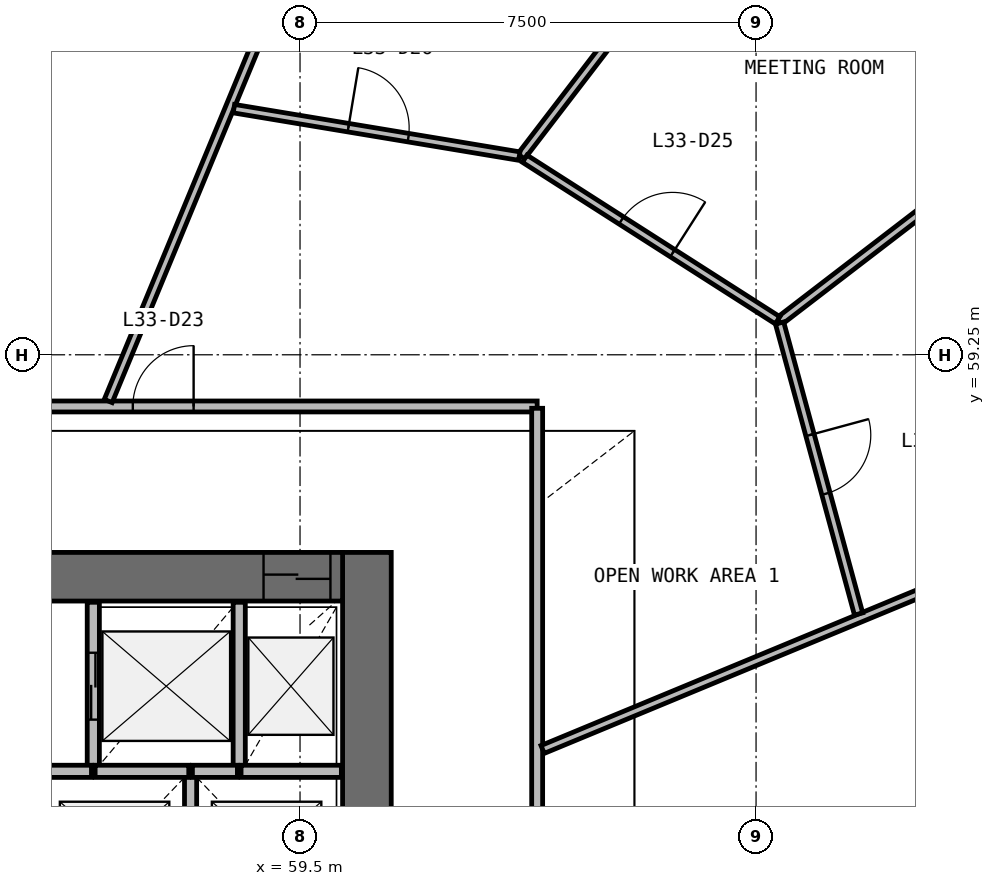
"""IFC4 building model, lengths in metres.
Left out: names, types, materials, properties, quantities, classifications, styles, units other than length and angle.
Written with IfcOpenShell. Run it as: python <this file> out.ifc"""

import sys

from ifc_helpers import new_model, si_unit, direction, frame, frame_2d, origin, place, context, subcontext, project, spatial, rectangle, extrude, source, transform, mapped, element, fill, save


model = new_model("IFC4")
c1 = context("Model", 3, precision=1e-05, world=origin(), true_north=direction((0.0, 1.0)))
c2 = subcontext(c1, "Body", "Model", "MODEL_VIEW")
j1 = project(units=[si_unit("LENGTHUNIT", "METRE"), si_unit("PLANEANGLEUNIT", "RADIAN")], contexts=[c1])
p1 = place(None, origin())
s1 = spatial("IfcSite", under=j1, at=p1, CompositionType="ELEMENT")
p2 = place(p1, origin())
s2 = spatial("IfcBuilding", under=s1, at=p2, CompositionType="ELEMENT")
p3 = place(p2, frame((0.0, 0.0, 140.9)))
s3 = spatial("IfcBuildingStorey", under=s2, at=p3, CompositionType="ELEMENT", Elevation=140.9)
p4 = place(p3, frame((60.6, 40.0, 0.0), z_axis=(0.0, 0.0, 1.0), x_axis=(0.0, 1.0, 0.0)))
e1 = element("IfcWall", 1, at=p4, inside=s3, PredefinedType="SHEAR", context=c2, shape_type="SweptSolid", body=[
    extrude(rectangle(XDim=16.0, YDim=0.8, at=frame_2d((8.0, 0.0))), origin(), (0.0, 0.0, 1.0), 3.9),
])
p5 = place(p4, frame((7.1, 0.0, 0.0)))
e2 = element("IfcOpeningElement", 2, at=p5, cuts=e1, PredefinedType="OPENING", context=c2, shape_type="SweptSolid", body=[
    extrude(rectangle(XDim=1.8, YDim=2.1, at=frame_2d((0.9, 1.05))), frame((0.0, 0.41, 0.0), z_axis=(0.0, -1.0, 0.0), x_axis=(1.0, 0.0, 0.0)), (0.0, 0.0, 1.0), 0.82),
])
p6 = place(p3, frame((60.2, 55.6, 0.0), z_axis=(0.0, 0.0, 1.0), x_axis=(-1.0, 0.0, 0.0)))
e3 = element("IfcWall", 3, at=p6, inside=s3, PredefinedType="SHEAR", context=c2, shape_type="SweptSolid", body=[
    extrude(rectangle(XDim=16.4, YDim=0.8, at=frame_2d((8.2, 0.0))), origin(), (0.0, 0.0, 1.0), 3.9),
])
p7 = place(p6, frame((0.2, 0.0, 0.0)))
e4 = element("IfcOpeningElement", 4, at=p7, cuts=e3, PredefinedType="OPENING", context=c2, shape_type="SweptSolid", body=[
    extrude(rectangle(XDim=1.1, YDim=2.1, at=frame_2d((0.55, 1.05))), frame((0.0, 0.41, 0.0), z_axis=(0.0, -1.0, 0.0), x_axis=(1.0, 0.0, 0.0)), (0.0, 0.0, 1.0), 0.82),
])
p8 = place(p6, frame((10.1, 0.0, 0.0)))
e5 = element("IfcOpeningElement", 5, at=p8, cuts=e3, PredefinedType="OPENING", context=c2, shape_type="SweptSolid", body=[
    extrude(rectangle(XDim=1.2, YDim=2.1, at=frame_2d((0.6, 1.05))), frame((0.0, 0.41, 0.0), z_axis=(0.0, -1.0, 0.0), x_axis=(1.0, 0.0, 0.0)), (0.0, 0.0, 1.0), 0.82),
])
p9 = place(p6, frame((7.05, 0.0, 0.0)))
e6 = element("IfcOpeningElement", 6, at=p9, cuts=e3, PredefinedType="OPENING", context=c2, shape_type="SweptSolid", body=[
    extrude(rectangle(XDim=1.1, YDim=2.1, at=frame_2d((0.55, 1.05))), frame((0.0, 0.41, 0.0), z_axis=(0.0, -1.0, 0.0), x_axis=(1.0, 0.0, 0.0)), (0.0, 0.0, 1.0), 0.82),
])
p10 = place(p3, frame((56.1, 55.18, 0.0), z_axis=(0.0, 0.0, 1.0), x_axis=(0.0, -1.0, 0.0)))
e7 = element("IfcWall", 7, at=p10, inside=s3, PredefinedType="SOLIDWALL", context=c2, shape_type="SweptSolid", body=[
    extrude(rectangle(XDim=2.78, YDim=0.2, at=frame_2d((1.39, 0.0))), origin(), (0.0, 0.0, 1.0), 3.58),
])
p11 = place(p10, frame((0.83, 0.0, 0.0)))
e8 = element("IfcOpeningElement", 8, at=p11, cuts=e7, PredefinedType="OPENING", context=c2, shape_type="SweptSolid", body=[
    extrude(rectangle(XDim=1.1, YDim=2.1, at=frame_2d((0.55, 1.05))), frame((0.0, 0.11, 0.0), z_axis=(0.0, -1.0, 0.0), x_axis=(1.0, 0.0, 0.0)), (0.0, 0.0, 1.0), 0.22),
])
p12 = place(p3, frame((58.5, 52.4, 0.0), z_axis=(0.0, 0.0, 1.0), x_axis=(0.0, 1.0, 0.0)))
e9 = element("IfcWall", 9, at=p12, inside=s3, PredefinedType="SOLIDWALL", context=c2, shape_type="SweptSolid", body=[
    extrude(rectangle(XDim=2.78, YDim=0.2, at=frame_2d((1.39, 0.0))), origin(), (0.0, 0.0, 1.0), 3.58),
])
p13 = place(p3, frame((57.7, 50.01, 0.0), z_axis=(0.0, 0.0, 1.0), x_axis=(0.0, 1.0, 0.0)))
e10 = element("IfcWall", 10, at=p13, inside=s3, PredefinedType="SOLIDWALL", context=c2, shape_type="SweptSolid", body=[
    extrude(rectangle(XDim=2.39, YDim=0.2, at=frame_2d((1.195, 0.0))), origin(), (0.0, 0.0, 1.0), 3.58),
])
p14 = place(p3, frame((60.18, 52.4, 0.0), z_axis=(0.0, 0.0, 1.0), x_axis=(-1.0, 0.0, 0.0)))
e11 = element("IfcWall", 11, at=p14, inside=s3, PredefinedType="SOLIDWALL", context=c2, shape_type="SweptSolid", body=[
    extrude(rectangle(XDim=1.65, YDim=0.2, at=frame_2d((0.825, 0.0))), origin(), (0.0, 0.0, 1.0), 3.58),
])
p15 = place(p3, frame((57.67, 52.4, 0.0), z_axis=(0.0, 0.0, 1.0), x_axis=(-1.0, 0.0, 0.0)))
e12 = element("IfcWall", 12, at=p15, inside=s3, PredefinedType="SOLIDWALL", context=c2, shape_type="SweptSolid", body=[
    extrude(rectangle(XDim=1.54, YDim=0.2, at=frame_2d((0.77, 0.0))), origin(), (0.0, 0.0, 1.0), 3.58),
])
p16 = place(p3, frame((56.07, 52.4, 0.0), z_axis=(0.0, 0.0, 1.0), x_axis=(-1.0, 0.0, 0.0)))
e13 = element("IfcWall", 13, at=p16, inside=s3, PredefinedType="SOLIDWALL", context=c2, shape_type="SweptSolid", body=[
    extrude(rectangle(XDim=0.84, YDim=0.2, at=frame_2d((0.42, 0.0))), origin(), (0.0, 0.0, 1.0), 3.58),
])
p17 = place(p3, frame((58.47, 52.4, 0.0), z_axis=(0.0, 0.0, 1.0), x_axis=(-1.0, 0.0, 0.0)))
e14 = element("IfcWall", 14, at=p17, inside=s3, PredefinedType="SOLIDWALL", context=c2, shape_type="SweptSolid", body=[
    extrude(rectangle(XDim=0.74, YDim=0.2, at=frame_2d((0.37, 0.0))), origin(), (0.0, 0.0, 1.0), 3.58),
])
p18 = place(p3, frame((40.6, 58.4, 0.0), z_axis=(0.0, 0.0, 1.0), x_axis=(1.0, 0.0, 0.0)))
e15 = element("IfcWall", 15, at=p18, inside=s3, PredefinedType="PARTITIONING", context=c2, shape_type="SweptSolid", body=[
    extrude(rectangle(XDim=22.8, YDim=0.18, at=frame_2d((11.4, 0.0))), origin(), (0.0, 0.0, 1.0), 2.88),
])
p19 = place(p18, frame((16.15, 0.0, 0.0)))
e16 = element("IfcOpeningElement", 16, at=p19, cuts=e15, PredefinedType="OPENING", context=c2, shape_type="SweptSolid", body=[
    extrude(rectangle(XDim=1.0, YDim=2.1, at=frame_2d((0.5, 1.05))), frame((0.0, 0.1, 0.0), z_axis=(0.0, -1.0, 0.0), x_axis=(1.0, 0.0, 0.0)), (0.0, 0.0, 1.0), 0.2),
])
p20 = place(p18, frame((10.95, 0.0, 0.0)))
e17 = element("IfcOpeningElement", 17, at=p20, cuts=e15, PredefinedType="OPENING", context=c2, shape_type="SweptSolid", body=[
    extrude(rectangle(XDim=1.0, YDim=2.1, at=frame_2d((0.5, 1.05))), frame((0.0, 0.1, 0.0), z_axis=(0.0, -1.0, 0.0), x_axis=(1.0, 0.0, 0.0)), (0.0, 0.0, 1.0), 0.2),
])
p21 = place(p18, frame((8.75, 0.0, 0.0)))
e18 = element("IfcOpeningElement", 18, at=p21, cuts=e15, PredefinedType="OPENING", context=c2, shape_type="SweptSolid", body=[
    extrude(rectangle(XDim=1.0, YDim=2.1, at=frame_2d((0.5, 1.05))), frame((0.0, 0.1, 0.0), z_axis=(0.0, -1.0, 0.0), x_axis=(1.0, 0.0, 0.0)), (0.0, 0.0, 1.0), 0.2),
])
p22 = place(p3, frame((63.4, 58.37, 0.0), z_axis=(0.0, 0.0, 1.0), x_axis=(0.0, -1.0, 0.0)))
e19 = element("IfcWall", 19, at=p22, inside=s3, PredefinedType="PARTITIONING", context=c2, shape_type="SweptSolid", body=[
    extrude(rectangle(XDim=20.74, YDim=0.18, at=frame_2d((10.37, 0.0))), origin(), (0.0, 0.0, 1.0), 2.88),
])
p23 = place(p22, frame((15.39, 0.0, 0.0)))
e20 = element("IfcOpeningElement", 20, at=p23, cuts=e19, PredefinedType="OPENING", context=c2, shape_type="SweptSolid", body=[
    extrude(rectangle(XDim=0.9, YDim=2.1, at=frame_2d((0.45, 1.05))), frame((0.0, 0.1, 0.0), z_axis=(0.0, -1.0, 0.0), x_axis=(1.0, 0.0, 0.0)), (0.0, 0.0, 1.0), 0.2),
])
p24 = place(p22, frame((12.19, 0.0, 0.0)))
e21 = element("IfcOpeningElement", 21, at=p24, cuts=e19, PredefinedType="OPENING", context=c2, shape_type="SweptSolid", body=[
    extrude(rectangle(XDim=0.9, YDim=2.1, at=frame_2d((0.45, 1.05))), frame((0.0, 0.1, 0.0), z_axis=(0.0, -1.0, 0.0), x_axis=(1.0, 0.0, 0.0)), (0.0, 0.0, 1.0), 0.2),
])
p25 = place(p22, frame((9.89, 0.0, 0.0)))
e22 = element("IfcOpeningElement", 22, at=p25, cuts=e19, PredefinedType="OPENING", context=c2, shape_type="SweptSolid", body=[
    extrude(rectangle(XDim=1.0, YDim=2.1, at=frame_2d((0.5, 1.05))), frame((0.0, 0.1, 0.0), z_axis=(0.0, -1.0, 0.0), x_axis=(1.0, 0.0, 0.0)), (0.0, 0.0, 1.0), 0.2),
])
p26 = place(p3, frame((73.93, 57.084, 0.0), z_axis=(0.0, 0.0, 1.0), x_axis=(-0.923879643786, -0.382683163725, 0.0)))
e23 = element("IfcWall", 23, at=p26, inside=s3, PredefinedType="PARTITIONING", context=c2, shape_type="SweptSolid", body=[
    extrude(rectangle(XDim=11.3, YDim=0.14, at=frame_2d((5.65, 0.0))), origin(), (0.0, 0.0, 1.0), 2.88),
])
p27 = place(p3, frame((60.394, 68.264, 0.0), z_axis=(0.0, 0.0, 1.0), x_axis=(-0.382674486363, -0.923883238016, 0.0)))
e24 = element("IfcWall", 24, at=p27, inside=s3, PredefinedType="PARTITIONING", context=c2, shape_type="SweptSolid", body=[
    extrude(rectangle(XDim=10.58, YDim=0.14, at=frame_2d((5.29, 0.0))), origin(), (0.0, 0.0, 1.0), 2.88),
])
p28 = place(p3, frame((63.136, 62.512, 0.0), z_axis=(0.0, 0.0, 1.0), x_axis=(0.608759991658, 0.793354443207, 0.0)))
e25 = element("IfcWall", 25, at=p28, inside=s3, PredefinedType="PARTITIONING", context=c2, shape_type="SweptSolid", body=[
    extrude(rectangle(XDim=5.227, YDim=0.14, at=frame_2d((2.613, 0.0))), origin(), (0.0, 0.0, 1.0), 2.88),
])
p29 = place(p3, frame((67.379, 59.801, 0.0), z_axis=(0.0, 0.0, 1.0), x_axis=(0.79338135979, 0.608724911547, 0.0)))
e26 = element("IfcWall", 26, at=p29, inside=s3, PredefinedType="PARTITIONING", context=c2, shape_type="SweptSolid", body=[
    extrude(rectangle(XDim=5.101, YDim=0.14, at=frame_2d((2.55, 0.0))), origin(), (0.0, 0.0, 1.0), 2.88),
])
p30 = place(p3, frame((67.387, 59.772, 0.0), z_axis=(0.0, 0.0, 1.0), x_axis=(0.262079708004, -0.965046230319, 0.0)))
e27 = element("IfcWall", 27, at=p30, inside=s3, PredefinedType="PARTITIONING", context=c2, shape_type="SweptSolid", body=[
    extrude(rectangle(XDim=4.958, YDim=0.14, at=frame_2d((2.479, 0.0))), origin(), (0.0, 0.0, 1.0), 2.88),
])
p31 = place(p30, frame((1.908, 0.0, 0.0)))
e28 = element("IfcOpeningElement", 28, at=p31, cuts=e27, PredefinedType="OPENING", context=c2, shape_type="SweptSolid", body=[
    extrude(rectangle(XDim=1.0, YDim=2.1, at=frame_2d((0.5, 1.05))), frame((0.0, 0.08, 0.0), z_axis=(0.0, -1.0, 0.0), x_axis=(1.0, 0.0, 0.0)), (0.0, 0.0, 1.0), 0.16),
])
p32 = place(p3, frame((63.195, 62.475, 0.0), z_axis=(0.0, 0.0, 1.0), x_axis=(0.842625182258, -0.538500512743, 0.0)))
e29 = element("IfcWall", 29, at=p32, inside=s3, PredefinedType="PARTITIONING", context=c2, shape_type="SweptSolid", body=[
    extrude(rectangle(XDim=4.935, YDim=0.14, at=frame_2d((2.468, 0.0))), origin(), (0.0, 0.0, 1.0), 2.88),
])
p33 = place(p32, frame((1.885, 0.0, 0.0)))
e30 = element("IfcOpeningElement", 30, at=p33, cuts=e29, PredefinedType="OPENING", context=c2, shape_type="SweptSolid", body=[
    extrude(rectangle(XDim=1.0, YDim=2.1, at=frame_2d((0.5, 1.05))), frame((0.0, 0.08, 0.0), z_axis=(0.0, -1.0, 0.0), x_axis=(1.0, 0.0, 0.0)), (0.0, 0.0, 1.0), 0.16),
])
p34 = place(p3, frame((58.412, 63.298, 0.0), z_axis=(0.0, 0.0, 1.0), x_axis=(0.986464551943, -0.163974655849, 0.0)))
e31 = element("IfcWall", 31, at=p34, inside=s3, PredefinedType="PARTITIONING", context=c2, shape_type="SweptSolid", body=[
    extrude(rectangle(XDim=4.759, YDim=0.14, at=frame_2d((2.379, 0.0))), origin(), (0.0, 0.0, 1.0), 2.88),
])
p35 = place(p34, frame((1.908, 0.0, 0.0)))
e32 = element("IfcOpeningElement", 32, at=p35, cuts=e31, PredefinedType="OPENING", context=c2, shape_type="SweptSolid", body=[
    extrude(rectangle(XDim=1.0, YDim=2.1, at=frame_2d((0.5, 1.05))), frame((0.0, 0.08, 0.0), z_axis=(0.0, -1.0, 0.0), x_axis=(1.0, 0.0, 0.0)), (0.0, 0.0, 1.0), 0.16),
])
m1 = source(origin(), c2, "Body", "SweptSolid", [
    extrude(rectangle(XDim=1.1, YDim=2.1, at=frame_2d((0.55, 1.05))), frame((0.0, 0.025, 0.0), z_axis=(0.0, -1.0, 0.0), x_axis=(1.0, 0.0, 0.0)), (0.0, 0.0, 1.0), 0.05),
])
p36 = place(p11, origin())
e33 = element("IfcDoor", 33, at=p36, inside=s3, OperationType="DOUBLE_DOOR_SLIDING", PredefinedType="USERDEFINED", context=c2, shape_type="MappedRepresentation", body=[
    mapped(m1, transform((0.0, 0.0, 0.0), scale=1.0)),
])
fill(e8, e33)
p37 = place(p7, origin())
e34 = element("IfcDoor", 34, at=p37, inside=s3, OperationType="DOUBLE_DOOR_SLIDING", PredefinedType="USERDEFINED", context=c2, shape_type="MappedRepresentation", body=[
    mapped(m1, transform((0.0, 0.0, 0.0), scale=1.0)),
])
fill(e4, e34)
m2 = source(origin(), c2, "Body", "SweptSolid", [
    extrude(rectangle(XDim=1.0, YDim=2.1, at=frame_2d((0.5, 1.05))), frame((0.0, 0.025, 0.0), z_axis=(0.0, -1.0, 0.0), x_axis=(1.0, 0.0, 0.0)), (0.0, 0.0, 1.0), 0.05),
])
p38 = place(p19, origin())
e35 = element("IfcDoor", 35, at=p38, inside=s3, OperationType="SINGLE_SWING_RIGHT", PredefinedType="DOOR", context=c2, shape_type="MappedRepresentation", body=[
    mapped(m2, transform((0.0, 0.0, 0.0), scale=1.0)),
])
fill(e16, e35)
p39 = place(p31, origin())
e36 = element("IfcDoor", 36, at=p39, inside=s3, OperationType="SINGLE_SWING_LEFT", PredefinedType="DOOR", context=c2, shape_type="MappedRepresentation", body=[
    mapped(m2, transform((0.0, 0.0, 0.0), scale=1.0)),
])
fill(e28, e36)
p40 = place(p33, origin())
e37 = element("IfcDoor", 37, at=p40, inside=s3, OperationType="SINGLE_SWING_RIGHT", PredefinedType="DOOR", context=c2, shape_type="MappedRepresentation", body=[
    mapped(m2, transform((0.0, 0.0, 0.0), scale=1.0)),
])
fill(e30, e37)
p41 = place(p35, origin())
e38 = element("IfcDoor", 38, at=p41, inside=s3, OperationType="SINGLE_SWING_LEFT", PredefinedType="DOOR", context=c2, shape_type="MappedRepresentation", body=[
    mapped(m2, transform((0.0, 0.0, 0.0), scale=1.0)),
])
fill(e32, e38)
save(model, sys.argv[1])
